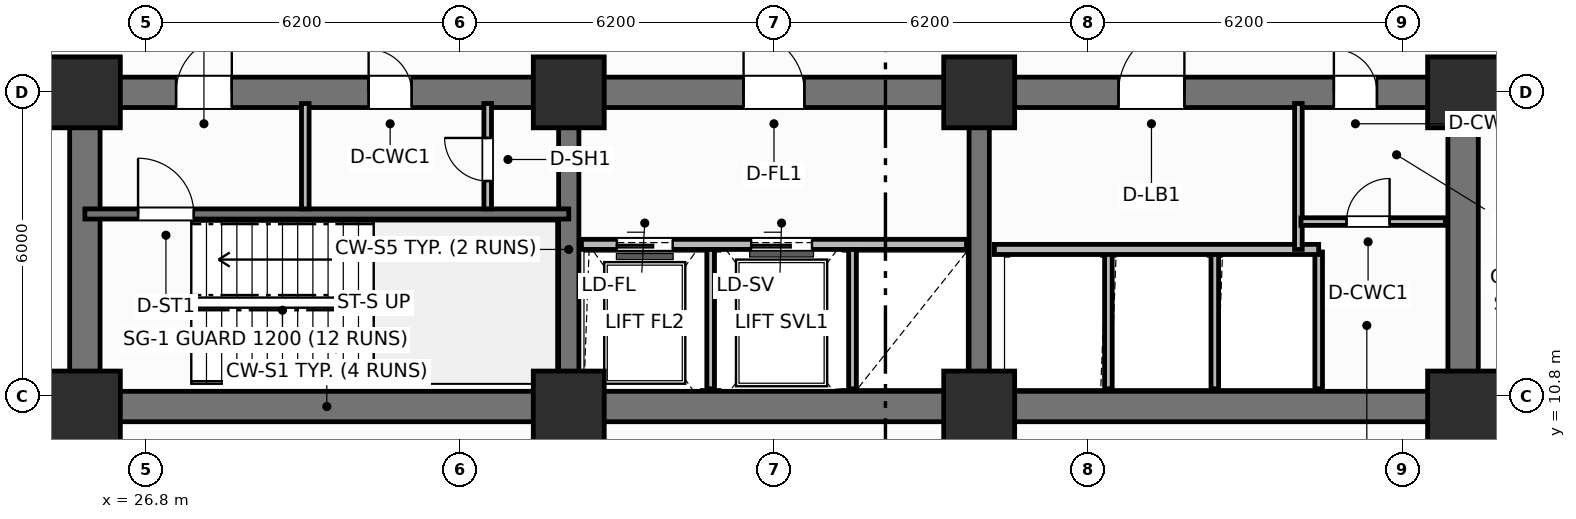
"""IFC4 building model, lengths in metres.
Left out: names, types, materials, properties, quantities, classifications, styles, units other than length and angle.
Written with IfcOpenShell. Run it as: python <this file> out.ifc"""

import sys

from ifc_helpers import new_model, si_unit, direction, frame, frame_2d, origin, origin_2d, place, context, subcontext, project, spatial, rectangle, extrude, element, fill, save


model = new_model("IFC4")
c1 = context("Model", 3, precision=1e-05, world=origin(), true_north=direction((0.0, 1.0)))
c2 = subcontext(c1, "Body", "Model", "MODEL_VIEW")
j1 = project(units=[si_unit("LENGTHUNIT", "METRE"), si_unit("PLANEANGLEUNIT", "RADIAN")], contexts=[c1])
p1 = place(None, origin())
s1 = spatial("IfcSite", under=j1, at=p1, CompositionType="ELEMENT")
p2 = place(p1, origin())
s2 = spatial("IfcBuilding", under=s1, at=p2, CompositionType="ELEMENT")
p3 = place(p2, frame((0.0, 0.0, 6.6)))
s3 = spatial("IfcBuildingStorey", under=s2, at=p3, CompositionType="ELEMENT", Elevation=6.6)
p4 = place(p3, frame((52.8, 10.6, 0.0), z_axis=(0.0, 0.0, 1.0), x_axis=(-1.0, 0.0, 0.0)))
e1 = element("IfcWall", 1, at=p4, inside=s3, PredefinedType="SHEAR", context=c2, shape_type="SweptSolid", body=[
    extrude(rectangle(XDim=27.2, YDim=0.6, at=frame_2d((13.6, 0.0))), origin(), (0.0, 0.0, 1.0), 4.5),
])
for number, where, z_axis, x_axis in (
    (2, (25.6, 10.9, 0.0), (0.0, 0.0, 1.0), (0.0, 1.0, 0.0)),
    (3, (52.8, 10.9, 0.0), (0.0, 0.0, 1.0), (0.0, 1.0, 0.0)),
):
    element("IfcWall", number, at=place(p3, frame(where, z_axis=z_axis, x_axis=x_axis)), inside=s3, PredefinedType="SHEAR", context=c2, shape_type="SweptSolid", body=[
        extrude(rectangle(XDim=5.6, YDim=0.6, at=frame_2d((2.8, 0.0))), origin(), (0.0, 0.0, 1.0), 4.5),
    ])
p5 = place(p3, frame((25.6, 16.8, 0.0), z_axis=(0.0, 0.0, 1.0), x_axis=(1.0, 0.0, 0.0)))
e4 = element("IfcWall", 4, at=p5, inside=s3, PredefinedType="SHEAR", context=c2, shape_type="SweptSolid", body=[
    extrude(rectangle(XDim=27.2, YDim=0.6, at=frame_2d((13.6, 0.0))), origin(), (0.0, 0.0, 1.0), 4.5),
])
p6 = place(p5, frame((1.8, 0.0, 0.0)))
e5 = element("IfcOpeningElement", 5, at=p6, cuts=e4, PredefinedType="OPENING", context=c2, shape_type="SweptSolid", body=[
    extrude(rectangle(XDim=1.1, YDim=2.15, at=frame_2d((0.55, 1.075))), frame((0.0, 0.31, 0.0), z_axis=(0.0, -1.0, 0.0), x_axis=(1.0, 0.0, 0.0)), (0.0, 0.0, 1.0), 0.62),
])
p7 = place(p5, frame((5.6, 0.0, 0.0)))
e6 = element("IfcOpeningElement", 6, at=p7, cuts=e4, PredefinedType="OPENING", context=c2, shape_type="SweptSolid", body=[
    extrude(rectangle(XDim=0.85, YDim=2.1, at=frame_2d((0.425, 1.05))), frame((0.0, 0.31, 0.0), z_axis=(0.0, -1.0, 0.0), x_axis=(1.0, 0.0, 0.0)), (0.0, 0.0, 1.0), 0.62),
])
p8 = place(p5, frame((13.0, 0.0, 0.0)))
e7 = element("IfcOpeningElement", 7, at=p8, cuts=e4, PredefinedType="OPENING", context=c2, shape_type="SweptSolid", body=[
    extrude(rectangle(XDim=1.2, YDim=2.15, at=frame_2d((0.6, 1.075))), frame((0.0, 0.31, 0.0), z_axis=(0.0, -1.0, 0.0), x_axis=(1.0, 0.0, 0.0)), (0.0, 0.0, 1.0), 0.62),
])
p9 = place(p5, frame((20.4, 0.0, 0.0)))
e8 = element("IfcOpeningElement", 8, at=p9, cuts=e4, PredefinedType="OPENING", context=c2, shape_type="SweptSolid", body=[
    extrude(rectangle(XDim=1.3, YDim=2.2, at=frame_2d((0.65, 1.1))), frame((0.0, 0.31, 0.0), z_axis=(0.0, -1.0, 0.0), x_axis=(1.0, 0.0, 0.0)), (0.0, 0.0, 1.0), 0.62),
])
p10 = place(p5, frame((24.65, 0.0, 0.0)))
e9 = element("IfcOpeningElement", 9, at=p10, cuts=e4, PredefinedType="OPENING", context=c2, shape_type="SweptSolid", body=[
    extrude(rectangle(XDim=0.85, YDim=2.1, at=frame_2d((0.425, 1.05))), frame((0.0, 0.31, 0.0), z_axis=(0.0, -1.0, 0.0), x_axis=(1.0, 0.0, 0.0)), (0.0, 0.0, 1.0), 0.62),
])
for number, where, z_axis, x_axis in (
    (10, (35.15, 10.9, 0.0), (0.0, 0.0, 1.0), (0.0, 1.0, 0.0)),
    (11, (43.25, 10.9, 0.0), (0.0, 0.0, 1.0), (0.0, 1.0, 0.0)),
):
    element("IfcWall", number, at=place(p3, frame(where, z_axis=z_axis, x_axis=x_axis)), inside=s3, PredefinedType="SHEAR", context=c2, shape_type="SweptSolid", body=[
        extrude(rectangle(XDim=5.6, YDim=0.4, at=frame_2d((2.8, 0.0))), origin(), (0.0, 0.0, 1.0), 4.5),
    ])
for number, where, z_axis, x_axis in (
    (12, (25.6, 10.6, 0.0), (0.0, 0.0, 1.0), (1.0, 0.0, 0.0)),
    (13, (25.6, 16.8, 0.0), (0.0, 0.0, 1.0), (1.0, 0.0, 0.0)),
    (14, (35.15, 10.6, 0.0), (0.0, 0.0, 1.0), (1.0, 0.0, 0.0)),
    (15, (35.15, 16.8, 0.0), (0.0, 0.0, 1.0), (1.0, 0.0, 0.0)),
    (16, (43.25, 10.6, 0.0), (0.0, 0.0, 1.0), (1.0, 0.0, 0.0)),
    (17, (43.25, 16.8, 0.0), (0.0, 0.0, 1.0), (1.0, 0.0, 0.0)),
    (18, (52.8, 10.6, 0.0), (0.0, 0.0, 1.0), (1.0, 0.0, 0.0)),
    (19, (52.8, 16.8, 0.0), (0.0, 0.0, 1.0), (1.0, 0.0, 0.0)),
):
    element("IfcColumn", number, at=place(p3, frame(where, z_axis=z_axis, x_axis=x_axis)), inside=s3, PredefinedType="COLUMN", context=c2, shape_type="SweptSolid", body=[
        extrude(rectangle(XDim=1.4, YDim=1.4, at=origin_2d()), origin(), (0.0, 0.0, 1.0), 4.5),
    ])
p11 = place(p3, frame((25.6, 14.4, 0.0), z_axis=(0.0, 0.0, 1.0), x_axis=(1.0, 0.0, 0.0)))
e20 = element("IfcWall", 20, at=p11, inside=s3, PredefinedType="SHEAR", context=c2, shape_type="SweptSolid", body=[
    extrude(rectangle(XDim=9.55, YDim=0.2, at=frame_2d((4.775, 0.0))), origin(), (0.0, 0.0, 1.0), 4.5),
])
p12 = place(p11, frame((1.05, 0.0, 0.0)))
e21 = element("IfcOpeningElement", 21, at=p12, cuts=e20, PredefinedType="OPENING", context=c2, shape_type="SweptSolid", body=[
    extrude(rectangle(XDim=1.1, YDim=2.15, at=frame_2d((0.55, 1.075))), frame((0.0, 0.11, 0.0), z_axis=(0.0, -1.0, 0.0), x_axis=(1.0, 0.0, 0.0)), (0.0, 0.0, 1.0), 0.22),
])
p13 = place(p3, frame((29.95, 14.5, 0.0), z_axis=(0.0, 0.0, 1.0), x_axis=(0.0, 1.0, 0.0)))
e22 = element("IfcWall", 22, at=p13, inside=s3, PredefinedType="PARTITIONING", context=c2, shape_type="SweptSolid", body=[
    extrude(rectangle(XDim=2.08, YDim=0.15, at=frame_2d((1.04, 0.0))), origin(), (0.0, 0.0, 1.0), 3.42),
])
p14 = place(p3, frame((33.55, 14.5, 0.0), z_axis=(0.0, 0.0, 1.0), x_axis=(0.0, 1.0, 0.0)))
e23 = element("IfcWall", 23, at=p14, inside=s3, PredefinedType="PARTITIONING", context=c2, shape_type="SweptSolid", body=[
    extrude(rectangle(XDim=2.08, YDim=0.15, at=frame_2d((1.04, 0.0))), origin(), (0.0, 0.0, 1.0), 3.42),
])
p15 = place(p14, frame((0.55, 0.0, 0.0)))
e24 = element("IfcOpeningElement", 24, at=p15, cuts=e23, PredefinedType="OPENING", context=c2, shape_type="SweptSolid", body=[
    extrude(rectangle(XDim=0.85, YDim=2.05, at=frame_2d((0.425, 1.025))), frame((0.0, 0.085, 0.0), z_axis=(0.0, -1.0, 0.0), x_axis=(1.0, 0.0, 0.0)), (0.0, 0.0, 1.0), 0.17),
])
p16 = place(p3, frame((35.4, 13.8, 0.0), z_axis=(0.0, 0.0, 1.0), x_axis=(1.0, 0.0, 0.0)))
e25 = element("IfcWall", 25, at=p16, inside=s3, PredefinedType="PARTITIONING", context=c2, shape_type="SweptSolid", body=[
    extrude(rectangle(XDim=7.6, YDim=0.2, at=frame_2d((3.8, 0.0))), origin(), (0.0, 0.0, 1.0), 3.08),
])
p17 = place(p16, frame((0.7, 0.0, 0.0)))
e26 = element("IfcOpeningElement", 26, at=p17, cuts=e25, PredefinedType="OPENING", context=c2, shape_type="SweptSolid", body=[
    extrude(rectangle(XDim=1.1, YDim=2.15, at=frame_2d((0.55, 1.075))), frame((0.0, 0.11, 0.0), z_axis=(0.0, -1.0, 0.0), x_axis=(1.0, 0.0, 0.0)), (0.0, 0.0, 1.0), 0.22),
])
p18 = place(p16, frame((3.35, 0.0, 0.0)))
e27 = element("IfcOpeningElement", 27, at=p18, cuts=e25, PredefinedType="OPENING", context=c2, shape_type="SweptSolid", body=[
    extrude(rectangle(XDim=1.2, YDim=2.15, at=frame_2d((0.6, 1.075))), frame((0.0, 0.11, 0.0), z_axis=(0.0, -1.0, 0.0), x_axis=(1.0, 0.0, 0.0)), (0.0, 0.0, 1.0), 0.22),
])
for number, where, z_axis, x_axis in (
    (28, (37.95, 10.95, 0.0), (0.0, 0.0, 1.0), (0.0, 1.0, 0.0)),
    (29, (40.75, 10.95, 0.0), (0.0, 0.0, 1.0), (0.0, 1.0, 0.0)),
):
    element("IfcWall", number, at=place(p3, frame(where, z_axis=z_axis, x_axis=x_axis)), inside=s3, PredefinedType="PARTITIONING", context=c2, shape_type="SweptSolid", body=[
        extrude(rectangle(XDim=2.75, YDim=0.15, at=frame_2d((1.375, 0.0))), origin(), (0.0, 0.0, 1.0), 3.42),
    ])
for number, where, z_axis, x_axis in (
    (30, (45.8, 10.95, 0.0), (0.0, 0.0, 1.0), (0.0, 1.0, 0.0)),
    (31, (47.9, 10.95, 0.0), (0.0, 0.0, 1.0), (0.0, 1.0, 0.0)),
    (32, (49.95, 10.95, 0.0), (0.0, 0.0, 1.0), (0.0, 1.0, 0.0)),
):
    element("IfcWall", number, at=place(p3, frame(where, z_axis=z_axis, x_axis=x_axis)), inside=s3, PredefinedType="PARTITIONING", context=c2, shape_type="SweptSolid", body=[
        extrude(rectangle(XDim=2.7, YDim=0.15, at=frame_2d((1.35, 0.0))), origin(), (0.0, 0.0, 1.0), 3.42),
    ])
p19 = place(p3, frame((43.55, 13.7, 0.0), z_axis=(0.0, 0.0, 1.0), x_axis=(1.0, 0.0, 0.0)))
e33 = element("IfcWall", 33, at=p19, inside=s3, PredefinedType="PARTITIONING", context=c2, shape_type="SweptSolid", body=[
    extrude(rectangle(XDim=6.4, YDim=0.2, at=frame_2d((3.2, 0.0))), origin(), (0.0, 0.0, 1.0), 3.42),
])
p20 = place(p3, frame((49.55, 13.7, 0.0), z_axis=(0.0, 0.0, 1.0), x_axis=(0.0, 1.0, 0.0)))
e34 = element("IfcWall", 34, at=p20, inside=s3, PredefinedType="PARTITIONING", context=c2, shape_type="SweptSolid", body=[
    extrude(rectangle(XDim=2.88, YDim=0.15, at=frame_2d((1.44, 0.0))), origin(), (0.0, 0.0, 1.0), 3.42),
])
p21 = place(p3, frame((49.6, 14.25, 0.0), z_axis=(0.0, 0.0, 1.0), x_axis=(1.0, 0.0, 0.0)))
e35 = element("IfcWall", 35, at=p21, inside=s3, PredefinedType="PARTITIONING", context=c2, shape_type="SweptSolid", body=[
    extrude(rectangle(XDim=2.85, YDim=0.15, at=frame_2d((1.425, 0.0))), origin(), (0.0, 0.0, 1.0), 3.42),
])
p22 = place(p21, frame((0.9, 0.0, 0.0)))
e36 = element("IfcOpeningElement", 36, at=p22, cuts=e35, PredefinedType="OPENING", context=c2, shape_type="SweptSolid", body=[
    extrude(rectangle(XDim=0.85, YDim=2.1, at=frame_2d((0.425, 1.05))), frame((0.0, 0.085, 0.0), z_axis=(0.0, -1.0, 0.0), x_axis=(1.0, 0.0, 0.0)), (0.0, 0.0, 1.0), 0.17),
])
p23 = place(p3, frame((12.0, 16.85, 0.0), z_axis=(0.0, 0.0, 1.0), x_axis=(1.0, 0.0, 0.0)))
e37 = element("IfcWall", 37, at=p23, inside=s3, PredefinedType="PARTITIONING", context=c2, shape_type="SweptSolid", body=[
    extrude(rectangle(XDim=13.25, YDim=0.15, at=frame_2d((6.625, 0.0))), origin(), (0.0, 0.0, 1.0), 3.42),
])
p24 = place(p23, frame((7.5, 0.0, 0.0)))
e38 = element("IfcOpeningElement", 38, at=p24, cuts=e37, PredefinedType="OPENING", context=c2, shape_type="SweptSolid", body=[
    extrude(rectangle(XDim=1.0, YDim=2.15, at=frame_2d((0.5, 1.075))), frame((0.0, 0.085, 0.0), z_axis=(0.0, -1.0, 0.0), x_axis=(1.0, 0.0, 0.0)), (0.0, 0.0, 1.0), 0.17),
])
p25 = place(p3, frame((53.15, 16.85, 0.0), z_axis=(0.0, 0.0, 1.0), x_axis=(1.0, 0.0, 0.0)))
e39 = element("IfcWall", 39, at=p25, inside=s3, PredefinedType="PARTITIONING", context=c2, shape_type="SweptSolid", body=[
    extrude(rectangle(XDim=13.25, YDim=0.15, at=frame_2d((6.625, 0.0))), origin(), (0.0, 0.0, 1.0), 3.42),
])
p26 = place(p25, frame((4.2, 0.0, 0.0)))
e40 = element("IfcOpeningElement", 40, at=p26, cuts=e39, PredefinedType="OPENING", context=c2, shape_type="SweptSolid", body=[
    extrude(rectangle(XDim=1.0, YDim=2.15, at=frame_2d((0.5, 1.075))), frame((0.0, 0.085, 0.0), z_axis=(0.0, -1.0, 0.0), x_axis=(1.0, 0.0, 0.0)), (0.0, 0.0, 1.0), 0.17),
])
p27 = place(p12, origin())
e41 = element("IfcDoor", 41, at=p27, inside=s3, OperationType="SINGLE_SWING_LEFT", PredefinedType="DOOR", context=c2, shape_type="SweptSolid", body=[
    extrude(rectangle(XDim=1.1, YDim=2.15, at=frame_2d((0.55, 1.075))), frame((0.0, 0.025, 0.0), z_axis=(0.0, -1.0, 0.0), x_axis=(1.0, 0.0, 0.0)), (0.0, 0.0, 1.0), 0.05),
])
fill(e21, e41)
p28 = place(p15, origin())
e42 = element("IfcDoor", 42, at=p28, inside=s3, OperationType="SINGLE_SWING_RIGHT", PredefinedType="TRAPDOOR", context=c2, shape_type="SweptSolid", body=[
    extrude(rectangle(XDim=0.85, YDim=2.05, at=frame_2d((0.425, 1.025))), frame((0.0, 0.025, 0.0), z_axis=(0.0, -1.0, 0.0), x_axis=(1.0, 0.0, 0.0)), (0.0, 0.0, 1.0), 0.05),
])
fill(e24, e42)
p29 = place(p17, origin())
e43 = element("IfcDoor", 43, at=p29, inside=s3, OperationType="SLIDING_TO_LEFT", PredefinedType="DOOR", context=c2, shape_type="SweptSolid", body=[
    extrude(rectangle(XDim=1.1, YDim=2.15, at=frame_2d((0.55, 1.075))), frame((0.0, 0.025, 0.0), z_axis=(0.0, -1.0, 0.0), x_axis=(1.0, 0.0, 0.0)), (0.0, 0.0, 1.0), 0.05),
])
fill(e26, e43)
p30 = place(p18, origin())
e44 = element("IfcDoor", 44, at=p30, inside=s3, OperationType="SLIDING_TO_LEFT", PredefinedType="DOOR", context=c2, shape_type="SweptSolid", body=[
    extrude(rectangle(XDim=1.2, YDim=2.15, at=frame_2d((0.6, 1.075))), frame((0.0, 0.025, 0.0), z_axis=(0.0, -1.0, 0.0), x_axis=(1.0, 0.0, 0.0)), (0.0, 0.0, 1.0), 0.05),
])
fill(e27, e44)
p31 = place(p22, origin())
e45 = element("IfcDoor", 45, at=p31, inside=s3, OperationType="SINGLE_SWING_RIGHT", PredefinedType="DOOR", context=c2, shape_type="SweptSolid", body=[
    extrude(rectangle(XDim=0.85, YDim=2.1, at=frame_2d((0.425, 1.05))), frame((0.0, 0.025, 0.0), z_axis=(0.0, -1.0, 0.0), x_axis=(1.0, 0.0, 0.0)), (0.0, 0.0, 1.0), 0.05),
])
fill(e36, e45)
p32 = place(p6, origin())
e46 = element("IfcDoor", 46, at=p32, inside=s3, OperationType="SINGLE_SWING_RIGHT", PredefinedType="DOOR", context=c2, shape_type="SweptSolid", body=[
    extrude(rectangle(XDim=1.1, YDim=2.15, at=frame_2d((0.55, 1.075))), frame((0.0, 0.025, 0.0), z_axis=(0.0, -1.0, 0.0), x_axis=(1.0, 0.0, 0.0)), (0.0, 0.0, 1.0), 0.05),
])
fill(e5, e46)
p33 = place(p7, origin())
e47 = element("IfcDoor", 47, at=p33, inside=s3, OperationType="SINGLE_SWING_LEFT", PredefinedType="DOOR", context=c2, shape_type="SweptSolid", body=[
    extrude(rectangle(XDim=0.85, YDim=2.1, at=frame_2d((0.425, 1.05))), frame((0.0, 0.025, 0.0), z_axis=(0.0, -1.0, 0.0), x_axis=(1.0, 0.0, 0.0)), (0.0, 0.0, 1.0), 0.05),
])
fill(e6, e47)
p34 = place(p8, origin())
e48 = element("IfcDoor", 48, at=p34, inside=s3, OperationType="SINGLE_SWING_LEFT", PredefinedType="DOOR", context=c2, shape_type="SweptSolid", body=[
    extrude(rectangle(XDim=1.2, YDim=2.15, at=frame_2d((0.6, 1.075))), frame((0.0, 0.025, 0.0), z_axis=(0.0, -1.0, 0.0), x_axis=(1.0, 0.0, 0.0)), (0.0, 0.0, 1.0), 0.05),
])
fill(e7, e48)
p35 = place(p9, origin())
e49 = element("IfcDoor", 49, at=p35, inside=s3, OperationType="SINGLE_SWING_RIGHT", PredefinedType="DOOR", context=c2, shape_type="SweptSolid", body=[
    extrude(rectangle(XDim=1.3, YDim=2.2, at=frame_2d((0.65, 1.1))), frame((0.0, 0.025, 0.0), z_axis=(0.0, -1.0, 0.0), x_axis=(1.0, 0.0, 0.0)), (0.0, 0.0, 1.0), 0.05),
])
fill(e8, e49)
p36 = place(p10, origin())
e50 = element("IfcDoor", 50, at=p36, inside=s3, OperationType="SINGLE_SWING_LEFT", PredefinedType="DOOR", context=c2, shape_type="SweptSolid", body=[
    extrude(rectangle(XDim=0.85, YDim=2.1, at=frame_2d((0.425, 1.05))), frame((0.0, 0.025, 0.0), z_axis=(0.0, -1.0, 0.0), x_axis=(1.0, 0.0, 0.0)), (0.0, 0.0, 1.0), 0.05),
])
fill(e9, e50)
save(model, sys.argv[1])
